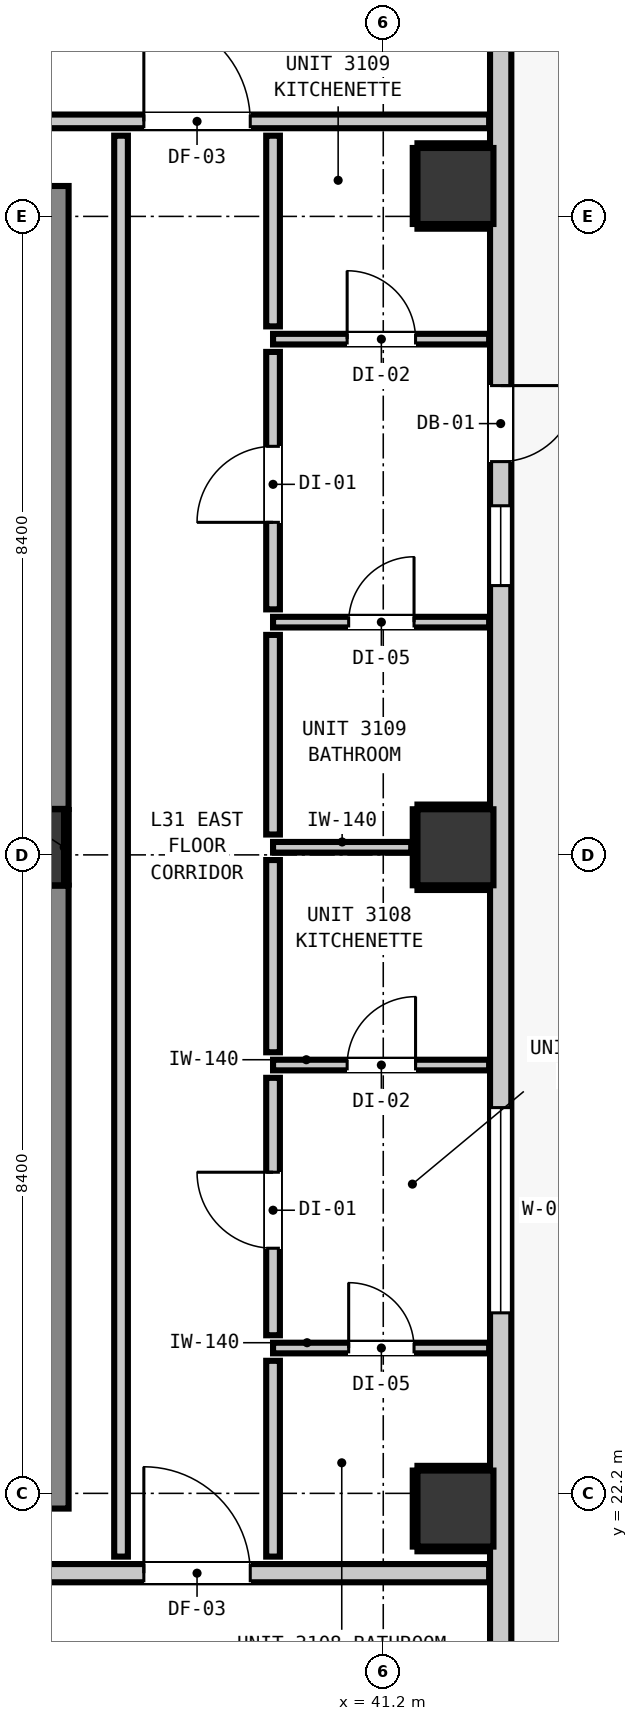
"""IFC4 building model, lengths in metres.
Left out: names, types, materials, properties, quantities, classifications, styles, units other than length and angle.
Written with IfcOpenShell. Run it as: python <this file> out.ifc"""

import sys

from ifc_helpers import new_model, si_unit, direction, frame, frame_2d, origin, origin_2d, place, context, subcontext, project, spatial, rectangle, extrude, element, fill, save


model = new_model("IFC4")
c1 = context("Model", 3, precision=1e-05, world=origin(), true_north=direction((0.0, 1.0)))
c2 = subcontext(c1, "Body", "Model", "MODEL_VIEW")
j1 = project(units=[si_unit("LENGTHUNIT", "METRE"), si_unit("PLANEANGLEUNIT", "RADIAN")], contexts=[c1])
p1 = place(None, origin())
s1 = spatial("IfcSite", under=j1, at=p1, CompositionType="ELEMENT")
p2 = place(p1, origin())
s2 = spatial("IfcBuilding", under=s1, at=p2, CompositionType="ELEMENT")
p3 = place(p2, frame((0.0, 0.0, 109.4)))
s3 = spatial("IfcBuildingStorey", under=s2, at=p3, CompositionType="ELEMENT", Elevation=109.4)
p4 = place(p3, frame((36.5, 30.7, 0.0), z_axis=(0.0, 0.0, 1.0), x_axis=(1.0, 0.0, 0.0)))
e1 = element("IfcColumn", 1, at=p4, inside=s3, PredefinedType="COLUMN", context=c2, shape_type="SweptSolid", body=[
    extrude(rectangle(XDim=1.0, YDim=1.0, at=origin_2d()), origin(), (0.0, 0.0, 1.0), 3.32),
])
p5 = place(p3, frame((36.56, 22.0, 0.0), z_axis=(0.0, 0.0, 1.0), x_axis=(0.0, 1.0, 0.0)))
e2 = element("IfcWall", 2, at=p5, inside=s3, PredefinedType="SHEAR", context=c2, shape_type="SweptSolid", body=[
    extrude(rectangle(XDim=8.195, YDim=1.0, at=frame_2d((4.098, 0.0))), origin(), (0.0, 0.0, 1.0), 3.32),
])
p6 = place(p3, frame((36.56, 31.205, 0.0), z_axis=(0.0, 0.0, 1.0), x_axis=(0.0, 1.0, 0.0)))
e3 = element("IfcWall", 3, at=p6, inside=s3, PredefinedType="SHEAR", context=c2, shape_type="SweptSolid", body=[
    extrude(rectangle(XDim=8.195, YDim=1.0, at=frame_2d((4.097, 0.0))), origin(), (0.0, 0.0, 1.0), 3.32),
])
for number, where, z_axis, x_axis in (
    (4, (42.15, 22.0, 0.0), (0.0, 0.0, 1.0), (1.0, 0.0, 0.0)),
    (5, (42.15, 30.7, 0.0), (0.0, 0.0, 1.0), (1.0, 0.0, 0.0)),
    (6, (42.15, 39.4, 0.0), (0.0, 0.0, 1.0), (1.0, 0.0, 0.0)),
):
    element("IfcColumn", number, at=place(p3, frame(where, z_axis=z_axis, x_axis=x_axis)), inside=s3, PredefinedType="COLUMN", context=c2, shape_type="SweptSolid", body=[
        extrude(rectangle(XDim=1.0, YDim=1.0, at=origin_2d()), origin(), (0.0, 0.0, 1.0), 3.32),
    ])
p7 = place(p3, frame((42.745, 43.645, 0.0), z_axis=(0.0, 0.0, 1.0), x_axis=(0.0, -1.0, 0.0)))
e7 = element("IfcWall", 7, at=p7, inside=s3, PredefinedType="STANDARD", context=c2, shape_type="SweptSolid", body=[
    extrude(rectangle(XDim=32.29, YDim=0.28, at=frame_2d((16.145, 0.0))), origin(), (0.0, 0.0, 1.0), 3.08),
])
p8 = place(p7, frame((6.871, 0.0, 0.0)))
e8 = element("IfcOpeningElement", 8, at=p8, cuts=e7, PredefinedType="OPENING", context=c2, shape_type="SweptSolid", body=[
    extrude(rectangle(XDim=1.0, YDim=2.15, at=frame_2d((0.5, 1.075))), frame((0.0, 0.15, 0.0), z_axis=(0.0, -1.0, 0.0), x_axis=(1.0, 0.0, 0.0)), (0.0, 0.0, 1.0), 0.3),
])
p9 = place(p7, frame((0.318, 0.0, 0.85)))
e9 = element("IfcOpeningElement", 9, at=p9, cuts=e7, PredefinedType="OPENING", context=c2, shape_type="SweptSolid", body=[
    extrude(rectangle(XDim=1.05, YDim=1.65, at=frame_2d((0.525, 0.825))), frame((0.0, 0.15, 0.0), z_axis=(0.0, -1.0, 0.0), x_axis=(1.0, 0.0, 0.0)), (0.0, 0.0, 1.0), 0.3),
])
p10 = place(p7, frame((16.37, 0.0, 0.85)))
e10 = element("IfcOpeningElement", 10, at=p10, cuts=e7, PredefinedType="OPENING", context=c2, shape_type="SweptSolid", body=[
    extrude(rectangle(XDim=2.7, YDim=2.0, at=frame_2d((1.35, 1.0))), frame((0.0, 0.15, 0.0), z_axis=(0.0, -1.0, 0.0), x_axis=(1.0, 0.0, 0.0)), (0.0, 0.0, 1.0), 0.3),
])
p11 = place(p7, frame((8.452, 0.0, 0.85)))
e11 = element("IfcOpeningElement", 11, at=p11, cuts=e7, PredefinedType="OPENING", context=c2, shape_type="SweptSolid", body=[
    extrude(rectangle(XDim=1.05, YDim=1.65, at=frame_2d((0.525, 0.825))), frame((0.0, 0.15, 0.0), z_axis=(0.0, -1.0, 0.0), x_axis=(1.0, 0.0, 0.0)), (0.0, 0.0, 1.0), 0.3),
])
p12 = place(p3, frame((3.207, 21.15, 0.0), z_axis=(0.0, 0.0, 1.0), x_axis=(1.0, 0.0, 0.0)))
e12 = element("IfcWall", 12, at=p12, inside=s3, PredefinedType="PARTITIONING", context=c2, shape_type="SweptSolid", body=[
    extrude(rectangle(XDim=39.386, YDim=0.24, at=frame_2d((19.693, 0.0))), origin(), (0.0, 0.0, 1.0), 3.08),
])
p13 = place(p12, frame((15.003, 0.0, 0.0)))
e13 = element("IfcOpeningElement", 13, at=p13, cuts=e12, PredefinedType="OPENING", context=c2, shape_type="SweptSolid", body=[
    extrude(rectangle(XDim=1.1, YDim=2.15, at=frame_2d((0.55, 1.075))), frame((0.0, 0.13, 0.0), z_axis=(0.0, -1.0, 0.0), x_axis=(1.0, 0.0, 0.0)), (0.0, 0.0, 1.0), 0.26),
])
p14 = place(p12, frame((7.243, 0.0, 0.0)))
e14 = element("IfcOpeningElement", 14, at=p14, cuts=e12, PredefinedType="OPENING", context=c2, shape_type="SweptSolid", body=[
    extrude(rectangle(XDim=1.4, YDim=2.15, at=frame_2d((0.7, 1.075))), frame((0.0, 0.13, 0.0), z_axis=(0.0, -1.0, 0.0), x_axis=(1.0, 0.0, 0.0)), (0.0, 0.0, 1.0), 0.26),
])
p15 = place(p12, frame((34.843, 0.0, 0.0)))
e15 = element("IfcOpeningElement", 15, at=p15, cuts=e12, PredefinedType="OPENING", context=c2, shape_type="SweptSolid", body=[
    extrude(rectangle(XDim=1.4, YDim=2.15, at=frame_2d((0.7, 1.075))), frame((0.0, 0.13, 0.0), z_axis=(0.0, -1.0, 0.0), x_axis=(1.0, 0.0, 0.0)), (0.0, 0.0, 1.0), 0.26),
])
p16 = place(p3, frame((12.979, 40.25, 0.0), z_axis=(0.0, 0.0, 1.0), x_axis=(1.0, 0.0, 0.0)))
e16 = element("IfcWall", 16, at=p16, inside=s3, PredefinedType="PARTITIONING", context=c2, shape_type="SweptSolid", body=[
    extrude(rectangle(XDim=29.614, YDim=0.18, at=frame_2d((14.807, 0.0))), origin(), (0.0, 0.0, 1.0), 3.08),
])
p17 = place(p16, frame((4.456, 0.0, 0.0)))
e17 = element("IfcOpeningElement", 17, at=p17, cuts=e16, PredefinedType="OPENING", context=c2, shape_type="SweptSolid", body=[
    extrude(rectangle(XDim=1.4, YDim=2.15, at=frame_2d((0.7, 1.075))), frame((0.0, 0.1, 0.0), z_axis=(0.0, -1.0, 0.0), x_axis=(1.0, 0.0, 0.0)), (0.0, 0.0, 1.0), 0.2),
])
p18 = place(p16, frame((25.071, 0.0, 0.0)))
e18 = element("IfcOpeningElement", 18, at=p18, cuts=e16, PredefinedType="OPENING", context=c2, shape_type="SweptSolid", body=[
    extrude(rectangle(XDim=1.4, YDim=2.15, at=frame_2d((0.7, 1.075))), frame((0.0, 0.1, 0.0), z_axis=(0.0, -1.0, 0.0), x_axis=(1.0, 0.0, 0.0)), (0.0, 0.0, 1.0), 0.2),
])
p19 = place(p3, frame((39.75, 24.112, 0.0), z_axis=(0.0, 0.0, 1.0), x_axis=(1.0, 0.0, 0.0)))
e19 = element("IfcWall", 19, at=p19, inside=s3, PredefinedType="PARTITIONING", context=c2, shape_type="SweptSolid", body=[
    extrude(rectangle(XDim=2.843, YDim=0.14, at=frame_2d((1.421, 0.0))), origin(), (0.0, 0.0, 1.0), 3.08),
])
p20 = place(p19, frame((0.995, 0.0, 0.0)))
e20 = element("IfcOpeningElement", 20, at=p20, cuts=e19, PredefinedType="OPENING", context=c2, shape_type="SweptSolid", body=[
    extrude(rectangle(XDim=0.86, YDim=2.02, at=frame_2d((0.43, 1.01))), frame((0.0, 0.08, 0.0), z_axis=(0.0, -1.0, 0.0), x_axis=(1.0, 0.0, 0.0)), (0.0, 0.0, 1.0), 0.16),
])
p21 = place(p3, frame((39.75, 27.835, 0.0), z_axis=(0.0, 0.0, 1.0), x_axis=(1.0, 0.0, 0.0)))
e21 = element("IfcWall", 21, at=p21, inside=s3, PredefinedType="PARTITIONING", context=c2, shape_type="SweptSolid", body=[
    extrude(rectangle(XDim=2.843, YDim=0.14, at=frame_2d((1.421, 0.0))), origin(), (0.0, 0.0, 1.0), 3.08),
])
p22 = place(p21, frame((0.975, 0.0, 0.0)))
e22 = element("IfcOpeningElement", 22, at=p22, cuts=e21, PredefinedType="OPENING", context=c2, shape_type="SweptSolid", body=[
    extrude(rectangle(XDim=0.9, YDim=2.1, at=frame_2d((0.45, 1.05))), frame((0.0, 0.08, 0.0), z_axis=(0.0, -1.0, 0.0), x_axis=(1.0, 0.0, 0.0)), (0.0, 0.0, 1.0), 0.16),
])
p23 = place(p3, frame((39.75, 30.7, 0.0), z_axis=(0.0, 0.0, 1.0), x_axis=(1.0, 0.0, 0.0)))
e23 = element("IfcWall", 23, at=p23, inside=s3, PredefinedType="PARTITIONING", context=c2, shape_type="SweptSolid", body=[
    extrude(rectangle(XDim=1.818, YDim=0.14, at=frame_2d((0.909, 0.0))), origin(), (0.0, 0.0, 1.0), 2.315),
])
p24 = place(p3, frame((39.75, 33.662, 0.0), z_axis=(0.0, 0.0, 1.0), x_axis=(1.0, 0.0, 0.0)))
e24 = element("IfcWall", 24, at=p24, inside=s3, PredefinedType="PARTITIONING", context=c2, shape_type="SweptSolid", body=[
    extrude(rectangle(XDim=2.843, YDim=0.14, at=frame_2d((1.421, 0.0))), origin(), (0.0, 0.0, 1.0), 3.08),
])
p25 = place(p24, frame((0.995, 0.0, 0.0)))
e25 = element("IfcOpeningElement", 25, at=p25, cuts=e24, PredefinedType="OPENING", context=c2, shape_type="SweptSolid", body=[
    extrude(rectangle(XDim=0.86, YDim=2.02, at=frame_2d((0.43, 1.01))), frame((0.0, 0.08, 0.0), z_axis=(0.0, -1.0, 0.0), x_axis=(1.0, 0.0, 0.0)), (0.0, 0.0, 1.0), 0.16),
])
p26 = place(p3, frame((39.75, 37.385, 0.0), z_axis=(0.0, 0.0, 1.0), x_axis=(1.0, 0.0, 0.0)))
e26 = element("IfcWall", 26, at=p26, inside=s3, PredefinedType="PARTITIONING", context=c2, shape_type="SweptSolid", body=[
    extrude(rectangle(XDim=2.843, YDim=0.14, at=frame_2d((1.421, 0.0))), origin(), (0.0, 0.0, 1.0), 3.08),
])
p27 = place(p26, frame((0.975, 0.0, 0.0)))
e27 = element("IfcOpeningElement", 27, at=p27, cuts=e26, PredefinedType="OPENING", context=c2, shape_type="SweptSolid", body=[
    extrude(rectangle(XDim=0.9, YDim=2.1, at=frame_2d((0.45, 1.05))), frame((0.0, 0.08, 0.0), z_axis=(0.0, -1.0, 0.0), x_axis=(1.0, 0.0, 0.0)), (0.0, 0.0, 1.0), 0.16),
])
p28 = place(p3, frame((37.75, 21.368, 0.0), z_axis=(0.0, 0.0, 1.0), x_axis=(0.0, 1.0, 0.0)))
e28 = element("IfcWall", 28, at=p28, inside=s3, PredefinedType="PARTITIONING", context=c2, shape_type="SweptSolid", body=[
    extrude(rectangle(XDim=18.694, YDim=0.18, at=frame_2d((9.347, 0.0))), origin(), (0.0, 0.0, 1.0), 3.08),
])
p29 = place(p3, frame((39.75, 21.368, 0.0), z_axis=(0.0, 0.0, 1.0), x_axis=(0.0, 1.0, 0.0)))
e29 = element("IfcWall", 29, at=p29, inside=s3, PredefinedType="PARTITIONING", context=c2, shape_type="SweptSolid", body=[
    extrude(rectangle(XDim=2.576, YDim=0.18, at=frame_2d((1.288, 0.0))), origin(), (0.0, 0.0, 1.0), 3.08),
])
p30 = place(p3, frame((39.75, 24.28, 0.0), z_axis=(0.0, 0.0, 1.0), x_axis=(0.0, 1.0, 0.0)))
e30 = element("IfcWall", 30, at=p30, inside=s3, PredefinedType="PARTITIONING", context=c2, shape_type="SweptSolid", body=[
    extrude(rectangle(XDim=3.387, YDim=0.18, at=frame_2d((1.693, 0.0))), origin(), (0.0, 0.0, 1.0), 3.08),
])
p31 = place(p30, frame((1.145, 0.0, 0.0)))
e31 = element("IfcOpeningElement", 31, at=p31, cuts=e30, PredefinedType="OPENING", context=c2, shape_type="SweptSolid", body=[
    extrude(rectangle(XDim=1.0, YDim=2.15, at=frame_2d((0.5, 1.075))), frame((0.0, 0.1, 0.0), z_axis=(0.0, -1.0, 0.0), x_axis=(1.0, 0.0, 0.0)), (0.0, 0.0, 1.0), 0.2),
])
p32 = place(p3, frame((39.75, 28.003, 0.0), z_axis=(0.0, 0.0, 1.0), x_axis=(0.0, 1.0, 0.0)))
e32 = element("IfcWall", 32, at=p32, inside=s3, PredefinedType="PARTITIONING", context=c2, shape_type="SweptSolid", body=[
    extrude(rectangle(XDim=2.529, YDim=0.18, at=frame_2d((1.265, 0.0))), origin(), (0.0, 0.0, 1.0), 3.08),
])
p33 = place(p3, frame((39.75, 30.868, 0.0), z_axis=(0.0, 0.0, 1.0), x_axis=(0.0, 1.0, 0.0)))
e33 = element("IfcWall", 33, at=p33, inside=s3, PredefinedType="PARTITIONING", context=c2, shape_type="SweptSolid", body=[
    extrude(rectangle(XDim=2.626, YDim=0.18, at=frame_2d((1.313, 0.0))), origin(), (0.0, 0.0, 1.0), 3.08),
])
p34 = place(p3, frame((39.75, 33.83, 0.0), z_axis=(0.0, 0.0, 1.0), x_axis=(0.0, 1.0, 0.0)))
e34 = element("IfcWall", 34, at=p34, inside=s3, PredefinedType="PARTITIONING", context=c2, shape_type="SweptSolid", body=[
    extrude(rectangle(XDim=3.387, YDim=0.18, at=frame_2d((1.693, 0.0))), origin(), (0.0, 0.0, 1.0), 3.08),
])
p35 = place(p34, frame((1.145, 0.0, 0.0)))
e35 = element("IfcOpeningElement", 35, at=p35, cuts=e34, PredefinedType="OPENING", context=c2, shape_type="SweptSolid", body=[
    extrude(rectangle(XDim=1.0, YDim=2.15, at=frame_2d((0.5, 1.075))), frame((0.0, 0.1, 0.0), z_axis=(0.0, -1.0, 0.0), x_axis=(1.0, 0.0, 0.0)), (0.0, 0.0, 1.0), 0.2),
])
p36 = place(p3, frame((39.75, 37.553, 0.0), z_axis=(0.0, 0.0, 1.0), x_axis=(0.0, 1.0, 0.0)))
e36 = element("IfcWall", 36, at=p36, inside=s3, PredefinedType="PARTITIONING", context=c2, shape_type="SweptSolid", body=[
    extrude(rectangle(XDim=2.509, YDim=0.18, at=frame_2d((1.254, 0.0))), origin(), (0.0, 0.0, 1.0), 3.08),
])
p37 = place(p3, frame((37.032, 30.21, 0.0), z_axis=(0.0, 0.0, 1.0), x_axis=(0.0, 1.0, 0.0)))
e37 = element("IfcWall", 37, at=p37, inside=s3, PredefinedType="PARTITIONING", context=c2, shape_type="SweptSolid", body=[
    extrude(rectangle(XDim=0.98, YDim=0.06, at=frame_2d((0.49, 0.0))), origin(), (0.0, 0.0, 1.0), 1.45),
])
for number, where, z_axis, x_axis in (
    (38, (41.65, 21.468, 0.0), (0.0, 0.0, 1.0), (1.0, 0.0, 0.0)),
    (39, (41.65, 22.532, 0.0), (0.0, 0.0, 1.0), (1.0, 0.0, 0.0)),
):
    element("IfcWall", number, at=place(p3, frame(where, z_axis=z_axis, x_axis=x_axis)), inside=s3, PredefinedType="PARTITIONING", context=c2, shape_type="SweptSolid", body=[
        extrude(rectangle(XDim=0.94, YDim=0.06, at=frame_2d((0.47, 0.0))), origin(), (0.0, 0.0, 1.0), 1.45),
    ])
p38 = place(p3, frame((41.618, 21.5, 0.0), z_axis=(0.0, 0.0, 1.0), x_axis=(0.0, 1.0, 0.0)))
e40 = element("IfcWall", 40, at=p38, inside=s3, PredefinedType="PARTITIONING", context=c2, shape_type="SweptSolid", body=[
    extrude(rectangle(XDim=1.0, YDim=0.06, at=frame_2d((0.5, 0.0))), origin(), (0.0, 0.0, 1.0), 1.45),
])
for number, where, z_axis, x_axis in (
    (41, (41.65, 30.168, 0.0), (0.0, 0.0, 1.0), (1.0, 0.0, 0.0)),
    (42, (41.65, 31.232, 0.0), (0.0, 0.0, 1.0), (1.0, 0.0, 0.0)),
):
    element("IfcWall", number, at=place(p3, frame(where, z_axis=z_axis, x_axis=x_axis)), inside=s3, PredefinedType="PARTITIONING", context=c2, shape_type="SweptSolid", body=[
        extrude(rectangle(XDim=0.94, YDim=0.06, at=frame_2d((0.47, 0.0))), origin(), (0.0, 0.0, 1.0), 1.45),
    ])
p39 = place(p3, frame((41.618, 30.2, 0.0), z_axis=(0.0, 0.0, 1.0), x_axis=(0.0, 1.0, 0.0)))
e43 = element("IfcWall", 43, at=p39, inside=s3, PredefinedType="PARTITIONING", context=c2, shape_type="SweptSolid", body=[
    extrude(rectangle(XDim=1.0, YDim=0.06, at=frame_2d((0.5, 0.0))), origin(), (0.0, 0.0, 1.0), 1.45),
])
for number, where, z_axis, x_axis in (
    (44, (41.65, 38.868, 0.0), (0.0, 0.0, 1.0), (1.0, 0.0, 0.0)),
    (45, (41.65, 39.932, 0.0), (0.0, 0.0, 1.0), (1.0, 0.0, 0.0)),
):
    element("IfcWall", number, at=place(p3, frame(where, z_axis=z_axis, x_axis=x_axis)), inside=s3, PredefinedType="PARTITIONING", context=c2, shape_type="SweptSolid", body=[
        extrude(rectangle(XDim=0.94, YDim=0.06, at=frame_2d((0.47, 0.0))), origin(), (0.0, 0.0, 1.0), 1.45),
    ])
p40 = place(p3, frame((41.618, 38.9, 0.0), z_axis=(0.0, 0.0, 1.0), x_axis=(0.0, 1.0, 0.0)))
e46 = element("IfcWall", 46, at=p40, inside=s3, PredefinedType="PARTITIONING", context=c2, shape_type="SweptSolid", body=[
    extrude(rectangle(XDim=1.0, YDim=0.06, at=frame_2d((0.5, 0.0))), origin(), (0.0, 0.0, 1.0), 1.45),
])
p41 = place(p8, origin())
e47 = element("IfcDoor", 47, at=p41, inside=s3, OperationType="SINGLE_SWING_LEFT", PredefinedType="DOOR", context=c2, shape_type="SweptSolid", body=[
    extrude(rectangle(XDim=1.0, YDim=2.15, at=frame_2d((0.5, 1.075))), frame((0.0, 0.025, 0.0), z_axis=(0.0, -1.0, 0.0), x_axis=(1.0, 0.0, 0.0)), (0.0, 0.0, 1.0), 0.05),
])
fill(e8, e47)
p42 = place(p10, origin())
e48 = element("IfcWindow", 48, at=p42, inside=s3, PartitioningType="SINGLE_PANEL", PredefinedType="WINDOW", context=c2, shape_type="SweptSolid", body=[
    extrude(rectangle(XDim=2.7, YDim=2.0, at=frame_2d((1.35, 1.0))), frame((0.0, 0.03, 0.0), z_axis=(0.0, -1.0, 0.0), x_axis=(1.0, 0.0, 0.0)), (0.0, 0.0, 1.0), 0.06),
])
fill(e10, e48)
p43 = place(p11, origin())
e49 = element("IfcWindow", 49, at=p43, inside=s3, PartitioningType="SINGLE_PANEL", PredefinedType="WINDOW", context=c2, shape_type="SweptSolid", body=[
    extrude(rectangle(XDim=1.05, YDim=1.65, at=frame_2d((0.525, 0.825))), frame((0.0, 0.03, 0.0), z_axis=(0.0, -1.0, 0.0), x_axis=(1.0, 0.0, 0.0)), (0.0, 0.0, 1.0), 0.06),
])
fill(e11, e49)
p44 = place(p15, origin())
e50 = element("IfcDoor", 50, at=p44, inside=s3, OperationType="SINGLE_SWING_LEFT", PredefinedType="DOOR", context=c2, shape_type="SweptSolid", body=[
    extrude(rectangle(XDim=1.4, YDim=2.15, at=frame_2d((0.7, 1.075))), frame((0.0, 0.025, 0.0), z_axis=(0.0, -1.0, 0.0), x_axis=(1.0, 0.0, 0.0)), (0.0, 0.0, 1.0), 0.05),
])
fill(e15, e50)
p45 = place(p18, origin())
e51 = element("IfcDoor", 51, at=p45, inside=s3, OperationType="SINGLE_SWING_LEFT", PredefinedType="DOOR", context=c2, shape_type="SweptSolid", body=[
    extrude(rectangle(XDim=1.4, YDim=2.15, at=frame_2d((0.7, 1.075))), frame((0.0, 0.025, 0.0), z_axis=(0.0, -1.0, 0.0), x_axis=(1.0, 0.0, 0.0)), (0.0, 0.0, 1.0), 0.05),
])
fill(e18, e51)
p46 = place(p31, origin())
e52 = element("IfcDoor", 52, at=p46, inside=s3, OperationType="SINGLE_SWING_RIGHT", PredefinedType="DOOR", context=c2, shape_type="SweptSolid", body=[
    extrude(rectangle(XDim=1.0, YDim=2.15, at=frame_2d((0.5, 1.075))), frame((0.0, 0.025, 0.0), z_axis=(0.0, -1.0, 0.0), x_axis=(1.0, 0.0, 0.0)), (0.0, 0.0, 1.0), 0.05),
])
fill(e31, e52)
p47 = place(p20, origin())
e53 = element("IfcDoor", 53, at=p47, inside=s3, OperationType="SINGLE_SWING_LEFT", PredefinedType="DOOR", context=c2, shape_type="SweptSolid", body=[
    extrude(rectangle(XDim=0.86, YDim=2.02, at=frame_2d((0.43, 1.01))), frame((0.0, 0.025, 0.0), z_axis=(0.0, -1.0, 0.0), x_axis=(1.0, 0.0, 0.0)), (0.0, 0.0, 1.0), 0.05),
])
fill(e20, e53)
p48 = place(p22, origin())
e54 = element("IfcDoor", 54, at=p48, inside=s3, OperationType="SINGLE_SWING_RIGHT", PredefinedType="DOOR", context=c2, shape_type="SweptSolid", body=[
    extrude(rectangle(XDim=0.9, YDim=2.1, at=frame_2d((0.45, 1.05))), frame((0.0, 0.025, 0.0), z_axis=(0.0, -1.0, 0.0), x_axis=(1.0, 0.0, 0.0)), (0.0, 0.0, 1.0), 0.05),
])
fill(e22, e54)
p49 = place(p35, origin())
e55 = element("IfcDoor", 55, at=p49, inside=s3, OperationType="SINGLE_SWING_LEFT", PredefinedType="DOOR", context=c2, shape_type="SweptSolid", body=[
    extrude(rectangle(XDim=1.0, YDim=2.15, at=frame_2d((0.5, 1.075))), frame((0.0, 0.025, 0.0), z_axis=(0.0, -1.0, 0.0), x_axis=(1.0, 0.0, 0.0)), (0.0, 0.0, 1.0), 0.05),
])
fill(e35, e55)
p50 = place(p25, origin())
e56 = element("IfcDoor", 56, at=p50, inside=s3, OperationType="SINGLE_SWING_RIGHT", PredefinedType="DOOR", context=c2, shape_type="SweptSolid", body=[
    extrude(rectangle(XDim=0.86, YDim=2.02, at=frame_2d((0.43, 1.01))), frame((0.0, 0.025, 0.0), z_axis=(0.0, -1.0, 0.0), x_axis=(1.0, 0.0, 0.0)), (0.0, 0.0, 1.0), 0.05),
])
fill(e25, e56)
p51 = place(p27, origin())
e57 = element("IfcDoor", 57, at=p51, inside=s3, OperationType="SINGLE_SWING_LEFT", PredefinedType="DOOR", context=c2, shape_type="SweptSolid", body=[
    extrude(rectangle(XDim=0.9, YDim=2.1, at=frame_2d((0.45, 1.05))), frame((0.0, 0.025, 0.0), z_axis=(0.0, -1.0, 0.0), x_axis=(1.0, 0.0, 0.0)), (0.0, 0.0, 1.0), 0.05),
])
fill(e27, e57)
save(model, sys.argv[1])
